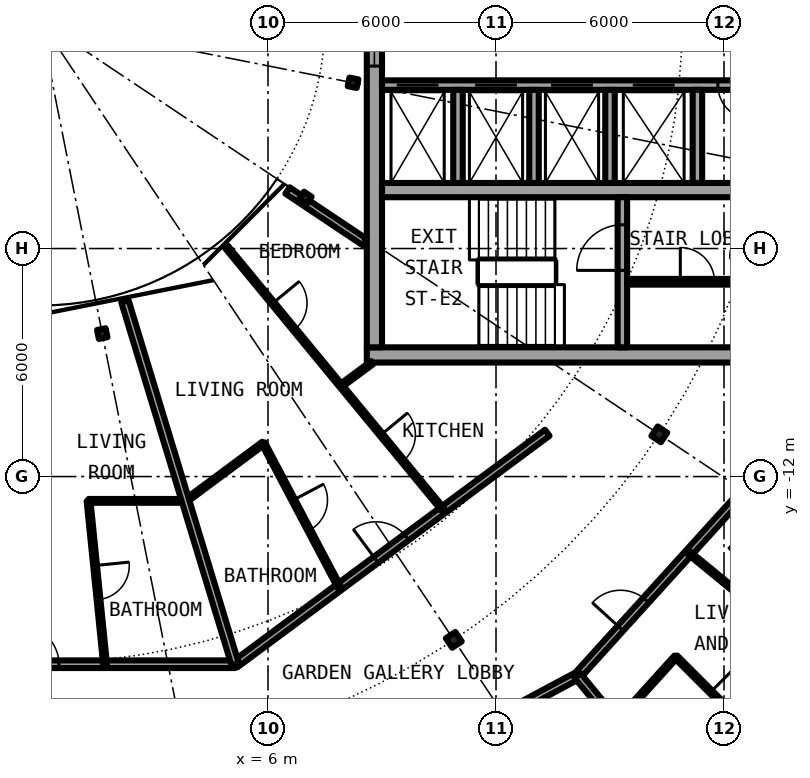
"""IFC4 building model, lengths in metres.
Left out: names, types, materials, properties, quantities, classifications, styles, units other than length and angle.
Written with IfcOpenShell. Run it as: python <this file> out.ifc"""

import sys

from ifc_helpers import new_model, si_unit, direction, frame, frame_2d, origin, origin_2d, place, context, subcontext, project, spatial, rectangle, i_section, extrude, element, fill, save


model = new_model("IFC4")
c1 = context("Model", 3, precision=1e-05, world=origin(), true_north=direction((0.0, 1.0)))
c2 = subcontext(c1, "Body", "Model", "MODEL_VIEW")
j1 = project(units=[si_unit("LENGTHUNIT", "METRE"), si_unit("PLANEANGLEUNIT", "RADIAN")], contexts=[c1])
p1 = place(None, origin())
s1 = spatial("IfcSite", under=j1, at=p1, CompositionType="ELEMENT")
p2 = place(p1, origin())
s2 = spatial("IfcBuilding", under=s1, at=p2, CompositionType="ELEMENT")
p3 = place(p2, frame((0.0, 0.0, 234.05)))
s3 = spatial("IfcBuildingStorey", under=s2, at=p3, CompositionType="ELEMENT", Elevation=234.05)
for number, where, z_axis, x_axis in (
    (1, (10.889, -16.297, 0.0), (0.0, 0.0, 1.0), (0.556, -0.831, 0.0)),
    (2, (16.297, -10.889, 0.0), (0.0, 0.0, 1.0), (0.831, -0.556, 0.0)),
):
    element("IfcColumn", number, at=place(p3, frame(where, z_axis=z_axis, x_axis=x_axis)), inside=s3, PredefinedType="COLUMN", context=c2, shape_type="SweptSolid", body=[
        extrude(i_section(OverallWidth=0.3, OverallDepth=0.3, WebThickness=0.011, FlangeThickness=0.019, FilletRadius=0.027, at=origin_2d()), origin(), (0.0, 0.0, 1.0), 3.05),
    ])
for number, where, z_axis, x_axis in (
    (3, (1.639, -8.239, 0.0), (0.0, 0.0, 1.0), (0.195, -0.981, 0.0)),
    (4, (6.984, -4.667, 0.0), (0.0, 0.0, 1.0), (0.831, -0.556, 0.0)),
    (5, (8.239, -1.639, 0.0), (0.0, 0.0, 1.0), (0.981, -0.195, 0.0)),
):
    element("IfcColumn", number, at=place(p3, frame(where, z_axis=z_axis, x_axis=x_axis)), inside=s3, PredefinedType="COLUMN", context=c2, shape_type="SweptSolid", body=[
        extrude(i_section(OverallWidth=0.24, OverallDepth=0.23, WebThickness=0.008, FlangeThickness=0.012, FilletRadius=0.021, at=origin_2d()), origin(), (0.0, 0.0, 1.0), 3.05),
    ])
p4 = place(p3, frame((8.6, -8.8, 0.0), z_axis=(0.0, 0.0, 1.0), x_axis=(1.0, 0.0, 0.0)))
e6 = element("IfcWall", 6, at=p4, inside=s3, PredefinedType="SHEAR", context=c2, shape_type="SweptSolid", body=[
    extrude(rectangle(XDim=13.4, YDim=0.4, at=frame_2d((6.7, 0.0))), origin(), (0.0, 0.0, 1.0), 3.05),
])
p5 = place(p4, frame((11.275, 0.0, 0.0)))
e7 = element("IfcOpeningElement", 7, at=p5, cuts=e6, PredefinedType="OPENING", context=c2, shape_type="SweptSolid", body=[
    extrude(rectangle(XDim=1.2, YDim=2.3, at=frame_2d((0.6, 1.15))), frame((0.0, 0.21, 0.0), z_axis=(0.0, -1.0, 0.0), x_axis=(1.0, 0.0, 0.0)), (0.0, 0.0, 1.0), 0.42),
])
p6 = place(p3, frame((8.8, -8.6, 0.0), z_axis=(0.0, 0.0, 1.0), x_axis=(0.0, 1.0, 0.0)))
e8 = element("IfcWall", 8, at=p6, inside=s3, PredefinedType="SHEAR", context=c2, shape_type="SweptSolid", body=[
    extrude(rectangle(XDim=17.2, YDim=0.4, at=frame_2d((8.6, 0.0))), origin(), (0.0, 0.0, 1.0), 3.05),
])
p7 = place(p6, frame((7.4, 0.0, 0.1)))
e9 = element("IfcOpeningElement", 9, at=p7, cuts=e8, PredefinedType="OPENING", context=c2, shape_type="SweptSolid", body=[
    extrude(rectangle(XDim=2.4, YDim=2.2, at=frame_2d((1.2, 1.1))), frame((0.0, 0.21, 0.0), z_axis=(0.0, -1.0, 0.0), x_axis=(1.0, 0.0, 0.0)), (0.0, 0.0, 1.0), 0.42),
])
p8 = place(p3, frame((19.15, -1.7, 0.0), z_axis=(0.0, 0.0, 1.0), x_axis=(-1.0, 0.0, 0.0)))
e10 = element("IfcWall", 10, at=p8, inside=s3, PredefinedType="SHEAR", context=c2, shape_type="SweptSolid", body=[
    extrude(rectangle(XDim=10.15, YDim=0.25, at=frame_2d((5.075, 0.0))), origin(), (0.0, 0.0, 1.0), 3.05),
])
p9 = place(p8, frame((8.663, 0.0, 0.0)))
e11 = element("IfcOpeningElement", 11, at=p9, cuts=e10, PredefinedType="OPENING", context=c2, shape_type="SweptSolid", body=[
    extrude(rectangle(XDim=1.1, YDim=2.3, at=frame_2d((0.55, 1.15))), frame((0.0, 0.135, 0.0), z_axis=(0.0, -1.0, 0.0), x_axis=(1.0, 0.0, 0.0)), (0.0, 0.0, 1.0), 0.27),
])
p10 = place(p8, frame((6.6, 0.0, 0.0)))
e12 = element("IfcOpeningElement", 12, at=p10, cuts=e10, PredefinedType="OPENING", context=c2, shape_type="SweptSolid", body=[
    extrude(rectangle(XDim=1.1, YDim=2.3, at=frame_2d((0.55, 1.15))), frame((0.0, 0.135, 0.0), z_axis=(0.0, -1.0, 0.0), x_axis=(1.0, 0.0, 0.0)), (0.0, 0.0, 1.0), 0.27),
])
p11 = place(p8, frame((4.6, 0.0, 0.0)))
e13 = element("IfcOpeningElement", 13, at=p11, cuts=e10, PredefinedType="OPENING", context=c2, shape_type="SweptSolid", body=[
    extrude(rectangle(XDim=1.1, YDim=2.3, at=frame_2d((0.55, 1.15))), frame((0.0, 0.135, 0.0), z_axis=(0.0, -1.0, 0.0), x_axis=(1.0, 0.0, 0.0)), (0.0, 0.0, 1.0), 0.27),
])
p12 = place(p8, frame((2.45, 0.0, 0.0)))
e14 = element("IfcOpeningElement", 14, at=p12, cuts=e10, PredefinedType="OPENING", context=c2, shape_type="SweptSolid", body=[
    extrude(rectangle(XDim=1.1, YDim=2.3, at=frame_2d((0.55, 1.15))), frame((0.0, 0.135, 0.0), z_axis=(0.0, -1.0, 0.0), x_axis=(1.0, 0.0, 0.0)), (0.0, 0.0, 1.0), 0.27),
])
p13 = place(p8, frame((0.413, 0.0, 0.0)))
e15 = element("IfcOpeningElement", 15, at=p13, cuts=e10, PredefinedType="OPENING", context=c2, shape_type="SweptSolid", body=[
    extrude(rectangle(XDim=0.9, YDim=2.3, at=frame_2d((0.45, 1.15))), frame((0.0, 0.135, 0.0), z_axis=(0.0, -1.0, 0.0), x_axis=(1.0, 0.0, 0.0)), (0.0, 0.0, 1.0), 0.27),
])
p14 = place(p3, frame((9.0, -4.462, 0.0), z_axis=(0.0, 0.0, 1.0), x_axis=(1.0, 0.0, 0.0)))
e16 = element("IfcWall", 16, at=p14, inside=s3, PredefinedType="SHEAR", context=c2, shape_type="SweptSolid", body=[
    extrude(rectangle(XDim=10.15, YDim=0.375, at=frame_2d((5.075, 0.0))), origin(), (0.0, 0.0, 1.0), 3.05),
])
p15 = place(p3, frame((15.325, -8.6, 0.0), z_axis=(0.0, 0.0, 1.0), x_axis=(0.0, 1.0, 0.0)))
e17 = element("IfcWall", 17, at=p15, inside=s3, PredefinedType="SHEAR", context=c2, shape_type="SweptSolid", body=[
    extrude(rectangle(XDim=3.95, YDim=0.25, at=frame_2d((1.975, 0.0))), origin(), (0.0, 0.0, 1.0), 3.05),
])
p16 = place(p15, frame((2.025, 0.0, 0.0)))
e18 = element("IfcOpeningElement", 18, at=p16, cuts=e17, PredefinedType="OPENING", context=c2, shape_type="SweptSolid", body=[
    extrude(rectangle(XDim=1.2, YDim=2.3, at=frame_2d((0.6, 1.15))), frame((0.0, 0.135, 0.0), z_axis=(0.0, -1.0, 0.0), x_axis=(1.0, 0.0, 0.0)), (0.0, 0.0, 1.0), 0.27),
])
for number, where, z_axis, x_axis in (
    (19, (15.0, -1.825, 0.0), (0.0, 0.0, 1.0), (0.0, -1.0, 0.0)),
    (20, (17.3, -1.825, 0.0), (0.0, 0.0, 1.0), (0.0, -1.0, 0.0)),
    (21, (11.0, -1.825, 0.0), (0.0, 0.0, 1.0), (0.0, -1.0, 0.0)),
    (22, (13.0, -1.825, 0.0), (0.0, 0.0, 1.0), (0.0, -1.0, 0.0)),
):
    element("IfcWall", number, at=place(p3, frame(where, z_axis=z_axis, x_axis=x_axis)), inside=s3, PredefinedType="SOLIDWALL", context=c2, shape_type="SweptSolid", body=[
        extrude(rectangle(XDim=2.45, YDim=0.25, at=frame_2d((1.225, 0.0))), origin(), (0.0, 0.0, 1.0), 2.7),
    ])
p17 = place(p3, frame((15.45, -6.875, 0.0), z_axis=(0.0, 0.0, 1.0), x_axis=(1.0, 0.0, 0.0)))
e23 = element("IfcWall", 23, at=p17, inside=s3, PredefinedType="PARTITIONING", context=c2, shape_type="SweptSolid", body=[
    extrude(rectangle(XDim=3.7, YDim=0.15, at=frame_2d((1.85, 0.0))), origin(), (0.0, 0.0, 1.0), 2.7),
])
p18 = place(p17, frame((1.4, 0.0, 0.0)))
e24 = element("IfcOpeningElement", 24, at=p18, cuts=e23, PredefinedType="OPENING", context=c2, shape_type="SweptSolid", body=[
    extrude(rectangle(XDim=0.9, YDim=2.3, at=frame_2d((0.45, 1.15))), frame((0.0, 0.085, 0.0), z_axis=(0.0, -1.0, 0.0), x_axis=(1.0, 0.0, 0.0)), (0.0, 0.0, 1.0), 0.17),
])
p19 = place(p3, frame((15.162, -18.475, 0.0), z_axis=(0.0, 0.0, 1.0), x_axis=(0.671528384412, 0.740978831634, 0.0)))
e25 = element("IfcWall", 25, at=p19, inside=s3, PredefinedType="PARTITIONING", context=c2, shape_type="SweptSolid", body=[
    extrude(rectangle(XDim=2.338, YDim=0.1, at=frame_2d((1.169, 0.0))), origin(), (0.0, 0.0, 1.0), 2.7),
])
p20 = place(p3, frame((14.147, -17.238, 0.0), z_axis=(0.0, 0.0, 1.0), x_axis=(0.671561669125, 0.740948665268, 0.0)))
e26 = element("IfcWall", 26, at=p20, inside=s3, PredefinedType="PARTITIONING", context=c2, shape_type="SweptSolid", body=[
    extrude(rectangle(XDim=6.544, YDim=0.2, at=frame_2d((3.272, 0.0))), origin(), (0.0, 0.0, 1.0), 2.7),
])
p21 = place(p20, frame((1.682, 0.0, 0.0)))
e27 = element("IfcOpeningElement", 27, at=p21, cuts=e26, PredefinedType="OPENING", context=c2, shape_type="SweptSolid", body=[
    extrude(rectangle(XDim=1.0, YDim=2.3, at=frame_2d((0.5, 1.15))), frame((0.0, 0.11, 0.0), z_axis=(0.0, -1.0, 0.0), x_axis=(1.0, 0.0, 0.0)), (0.0, 0.0, 1.0), 0.22),
])
p22 = place(p3, frame((6.48, -21.339, 0.0), z_axis=(0.0, 0.0, 1.0), x_axis=(0.881794682218, 0.471633478892, 0.0)))
e28 = element("IfcWall", 28, at=p22, inside=s3, PredefinedType="PARTITIONING", context=c2, shape_type="SweptSolid", body=[
    extrude(rectangle(XDim=8.702, YDim=0.2, at=frame_2d((4.351, 0.0))), origin(), (0.0, 0.0, 1.0), 2.7),
])
p23 = place(p22, frame((2.758, 0.0, 0.0)))
e29 = element("IfcOpeningElement", 29, at=p23, cuts=e28, PredefinedType="OPENING", context=c2, shape_type="SweptSolid", body=[
    extrude(rectangle(XDim=1.0, YDim=2.3, at=frame_2d((0.5, 1.15))), frame((0.0, 0.11, 0.0), z_axis=(0.0, -1.0, 0.0), x_axis=(1.0, 0.0, 0.0)), (0.0, 0.0, 1.0), 0.22),
])
p24 = place(p3, frame((-5.138, -16.938, 0.0), z_axis=(0.0, 0.0, 1.0), x_axis=(1.0, 0.0, 0.0)))
e30 = element("IfcWall", 30, at=p24, inside=s3, PredefinedType="PARTITIONING", context=c2, shape_type="SweptSolid", body=[
    extrude(rectangle(XDim=10.276, YDim=0.2, at=frame_2d((5.138, 0.0))), origin(), (0.0, 0.0, 1.0), 2.7),
])
p25 = place(p24, frame((4.638, 0.0, 0.0)))
e31 = element("IfcOpeningElement", 31, at=p25, cuts=e30, PredefinedType="OPENING", context=c2, shape_type="SweptSolid", body=[
    extrude(rectangle(XDim=1.0, YDim=2.3, at=frame_2d((0.5, 1.15))), frame((0.0, 0.11, 0.0), z_axis=(0.0, -1.0, 0.0), x_axis=(1.0, 0.0, 0.0)), (0.0, 0.0, 1.0), 0.22),
])
p26 = place(p3, frame((5.137, -16.938, 0.0), z_axis=(0.0, 0.0, 1.0), x_axis=(0.803229232922, 0.595670042371, 0.0)))
e32 = element("IfcWall", 32, at=p26, inside=s3, PredefinedType="PARTITIONING", context=c2, shape_type="SweptSolid", body=[
    extrude(rectangle(XDim=10.224, YDim=0.2, at=frame_2d((5.112, 0.0))), origin(), (0.0, 0.0, 1.0), 2.7),
])
p27 = place(p26, frame((4.612, 0.0, 0.0)))
e33 = element("IfcOpeningElement", 33, at=p27, cuts=e32, PredefinedType="OPENING", context=c2, shape_type="SweptSolid", body=[
    extrude(rectangle(XDim=1.0, YDim=2.3, at=frame_2d((0.5, 1.15))), frame((0.0, 0.11, 0.0), z_axis=(0.0, -1.0, 0.0), x_axis=(1.0, 0.0, 0.0)), (0.0, 0.0, 1.0), 0.22),
])
p28 = place(p3, frame((1.278, -12.64, 0.0), z_axis=(0.0, 0.0, 1.0), x_axis=(1.0, 0.0, 0.0)))
e34 = element("IfcWall", 34, at=p28, inside=s3, PredefinedType="PARTITIONING", context=c2, shape_type="SweptSolid", body=[
    extrude(rectangle(XDim=2.556, YDim=0.1, at=frame_2d((1.278, 0.0))), origin(), (0.0, 0.0, 1.0), 2.7),
])
p29 = place(p3, frame((3.834, -12.64, 0.0), z_axis=(0.0, 0.0, 1.0), x_axis=(0.803259509791, 0.595629213463, 0.0)))
e35 = element("IfcWall", 35, at=p29, inside=s3, PredefinedType="PARTITIONING", context=c2, shape_type="SweptSolid", body=[
    extrude(rectangle(XDim=2.543, YDim=0.1, at=frame_2d((1.272, 0.0))), origin(), (0.0, 0.0, 1.0), 2.7),
])
p30 = place(p3, frame((7.919, -9.611, 0.0), z_axis=(0.0, 0.0, 1.0), x_axis=(0.80321556998, 0.595688465677, 0.0)))
e36 = element("IfcWall", 36, at=p30, inside=s3, PredefinedType="PARTITIONING", context=c2, shape_type="SweptSolid", body=[
    extrude(rectangle(XDim=1.026, YDim=0.1, at=frame_2d((0.513, 0.0))), origin(), (0.0, 0.0, 1.0), 2.7),
])
p31 = place(p3, frame((6.513, -4.472, 0.0), z_axis=(0.0, 0.0, 1.0), x_axis=(0.831450132577, -0.555599385382, 0.0)))
e37 = element("IfcWall", 37, at=p31, inside=s3, PredefinedType="PARTITIONING", context=c2, shape_type="SweptSolid", body=[
    extrude(rectangle(XDim=2.443, YDim=0.2, at=frame_2d((1.221, 0.0))), origin(), (0.0, 0.0, 1.0), 2.7),
])
p32 = place(p3, frame((2.236, -7.39, 0.0), z_axis=(0.0, 0.0, 1.0), x_axis=(0.290580399904, -0.956850579344, 0.0)))
e38 = element("IfcWall", 38, at=p32, inside=s3, PredefinedType="PARTITIONING", context=c2, shape_type="SweptSolid", body=[
    extrude(rectangle(XDim=9.98, YDim=0.2, at=frame_2d((4.99, 0.0))), origin(), (0.0, 0.0, 1.0), 2.7),
])
p33 = place(p3, frame((17.077, -14.006, 0.0), z_axis=(0.0, 0.0, 1.0), x_axis=(0.773476341377, -0.633825172528, 0.0)))
e39 = element("IfcWall", 39, at=p33, inside=s3, PredefinedType="PARTITIONING", context=c2, shape_type="SweptSolid", body=[
    extrude(rectangle(XDim=1.584, YDim=0.1, at=frame_2d((0.792, 0.0))), origin(), (0.0, 0.0, 1.0), 2.7),
])
p34 = place(p3, frame((1.278, -12.64, 0.0), z_axis=(0.0, 0.0, 1.0), x_axis=(0.100650711003, -0.994921823248, 0.0)))
e40 = element("IfcWall", 40, at=p34, inside=s3, PredefinedType="PARTITIONING", context=c2, shape_type="SweptSolid", body=[
    extrude(rectangle(XDim=4.32, YDim=0.1, at=frame_2d((2.16, 0.0))), origin(), (0.0, 0.0, 1.0), 2.7),
])
p35 = place(p34, frame((1.71, 0.0, 0.0)))
e41 = element("IfcOpeningElement", 41, at=p35, cuts=e40, PredefinedType="OPENING", context=c2, shape_type="SweptSolid", body=[
    extrude(rectangle(XDim=0.9, YDim=2.3, at=frame_2d((0.45, 1.15))), frame((0.0, 0.06, 0.0), z_axis=(0.0, -1.0, 0.0), x_axis=(1.0, 0.0, 0.0)), (0.0, 0.0, 1.0), 0.12),
])
p36 = place(p3, frame((4.908, -5.959, 0.0), z_axis=(0.0, 0.0, 1.0), x_axis=(0.636115614725, -0.771593756262, 0.0)))
e42 = element("IfcWall", 42, at=p36, inside=s3, PredefinedType="PARTITIONING", context=c2, shape_type="SweptSolid", body=[
    extrude(rectangle(XDim=8.967, YDim=0.1, at=frame_2d((4.483, 0.0))), origin(), (0.0, 0.0, 1.0), 2.7),
])
p37 = place(p36, frame((6.4, 0.0, 0.0)))
e43 = element("IfcOpeningElement", 43, at=p37, cuts=e42, PredefinedType="OPENING", context=c2, shape_type="SweptSolid", body=[
    extrude(rectangle(XDim=0.9, YDim=2.3, at=frame_2d((0.45, 1.15))), frame((0.0, 0.06, 0.0), z_axis=(0.0, -1.0, 0.0), x_axis=(1.0, 0.0, 0.0)), (0.0, 0.0, 1.0), 0.12),
])
p38 = place(p36, frame((1.917, 0.0, 0.0)))
e44 = element("IfcOpeningElement", 44, at=p38, cuts=e42, PredefinedType="OPENING", context=c2, shape_type="SweptSolid", body=[
    extrude(rectangle(XDim=0.9, YDim=2.3, at=frame_2d((0.45, 1.15))), frame((0.0, 0.06, 0.0), z_axis=(0.0, -1.0, 0.0), x_axis=(1.0, 0.0, 0.0)), (0.0, 0.0, 1.0), 0.12),
])
p39 = place(p3, frame((5.877, -11.125, 0.0), z_axis=(0.0, 0.0, 1.0), x_axis=(0.467030118529, -0.884241408432, 0.0)))
e45 = element("IfcWall", 45, at=p39, inside=s3, PredefinedType="PARTITIONING", context=c2, shape_type="SweptSolid", body=[
    extrude(rectangle(XDim=4.278, YDim=0.1, at=frame_2d((2.139, 0.0))), origin(), (0.0, 0.0, 1.0), 2.7),
])
p40 = place(p39, frame((1.689, 0.0, 0.0)))
e46 = element("IfcOpeningElement", 46, at=p40, cuts=e45, PredefinedType="OPENING", context=c2, shape_type="SweptSolid", body=[
    extrude(rectangle(XDim=0.9, YDim=2.3, at=frame_2d((0.45, 1.15))), frame((0.0, 0.06, 0.0), z_axis=(0.0, -1.0, 0.0), x_axis=(1.0, 0.0, 0.0)), (0.0, 0.0, 1.0), 0.12),
])
p41 = place(p3, frame((14.147, -17.238, 0.0), z_axis=(0.0, 0.0, 1.0), x_axis=(0.634374159378, -0.773026148273, 0.0)))
e47 = element("IfcWall", 47, at=p41, inside=s3, PredefinedType="PARTITIONING", context=c2, shape_type="SweptSolid", body=[
    extrude(rectangle(XDim=4.876, YDim=0.2, at=frame_2d((2.438, 0.0))), origin(), (0.0, 0.0, 1.0), 2.7),
])
p42 = place(p3, frame((16.732, -16.743, 0.0), z_axis=(0.0, 0.0, 1.0), x_axis=(0.706967463531, -0.707246071398, 0.0)))
e48 = element("IfcWall", 48, at=p42, inside=s3, PredefinedType="PARTITIONING", context=c2, shape_type="SweptSolid", body=[
    extrude(rectangle(XDim=3.505, YDim=0.1, at=frame_2d((1.752, 0.0))), origin(), (0.0, 0.0, 1.0), 2.7),
])
p43 = place(p42, frame((1.303, 0.0, 0.0)))
e49 = element("IfcOpeningElement", 49, at=p43, cuts=e48, PredefinedType="OPENING", context=c2, shape_type="SweptSolid", body=[
    extrude(rectangle(XDim=0.9, YDim=2.3, at=frame_2d((0.45, 1.15))), frame((0.0, 0.06, 0.0), z_axis=(0.0, -1.0, 0.0), x_axis=(1.0, 0.0, 0.0)), (0.0, 0.0, 1.0), 0.12),
])
p44 = place(p9, origin())
e50 = element("IfcDoor", 50, at=p44, inside=s3, OperationType="DOUBLE_DOOR_SLIDING", PredefinedType="DOOR", context=c2, shape_type="SweptSolid", body=[
    extrude(rectangle(XDim=1.1, YDim=2.3, at=frame_2d((0.55, 1.15))), frame((0.0, 0.025, 0.0), z_axis=(0.0, -1.0, 0.0), x_axis=(1.0, 0.0, 0.0)), (0.0, 0.0, 1.0), 0.05),
])
fill(e11, e50)
p45 = place(p10, origin())
e51 = element("IfcDoor", 51, at=p45, inside=s3, OperationType="DOUBLE_DOOR_SLIDING", PredefinedType="DOOR", context=c2, shape_type="SweptSolid", body=[
    extrude(rectangle(XDim=1.1, YDim=2.3, at=frame_2d((0.55, 1.15))), frame((0.0, 0.025, 0.0), z_axis=(0.0, -1.0, 0.0), x_axis=(1.0, 0.0, 0.0)), (0.0, 0.0, 1.0), 0.05),
])
fill(e12, e51)
p46 = place(p11, origin())
e52 = element("IfcDoor", 52, at=p46, inside=s3, OperationType="DOUBLE_DOOR_SLIDING", PredefinedType="DOOR", context=c2, shape_type="SweptSolid", body=[
    extrude(rectangle(XDim=1.1, YDim=2.3, at=frame_2d((0.55, 1.15))), frame((0.0, 0.025, 0.0), z_axis=(0.0, -1.0, 0.0), x_axis=(1.0, 0.0, 0.0)), (0.0, 0.0, 1.0), 0.05),
])
fill(e13, e52)
p47 = place(p12, origin())
e53 = element("IfcDoor", 53, at=p47, inside=s3, OperationType="DOUBLE_DOOR_SLIDING", PredefinedType="DOOR", context=c2, shape_type="SweptSolid", body=[
    extrude(rectangle(XDim=1.1, YDim=2.3, at=frame_2d((0.55, 1.15))), frame((0.0, 0.025, 0.0), z_axis=(0.0, -1.0, 0.0), x_axis=(1.0, 0.0, 0.0)), (0.0, 0.0, 1.0), 0.05),
])
fill(e14, e53)
p48 = place(p13, origin())
e54 = element("IfcDoor", 54, at=p48, inside=s3, OperationType="SINGLE_SWING_RIGHT", PredefinedType="DOOR", context=c2, shape_type="SweptSolid", body=[
    extrude(rectangle(XDim=0.9, YDim=2.3, at=frame_2d((0.45, 1.15))), frame((0.0, 0.025, 0.0), z_axis=(0.0, -1.0, 0.0), x_axis=(1.0, 0.0, 0.0)), (0.0, 0.0, 1.0), 0.05),
])
fill(e15, e54)
p49 = place(p18, origin())
e55 = element("IfcDoor", 55, at=p49, inside=s3, OperationType="SINGLE_SWING_LEFT", PredefinedType="DOOR", context=c2, shape_type="SweptSolid", body=[
    extrude(rectangle(XDim=0.9, YDim=2.3, at=frame_2d((0.45, 1.15))), frame((0.0, 0.025, 0.0), z_axis=(0.0, -1.0, 0.0), x_axis=(1.0, 0.0, 0.0)), (0.0, 0.0, 1.0), 0.05),
])
fill(e24, e55)
p50 = place(p16, origin())
e56 = element("IfcDoor", 56, at=p50, inside=s3, OperationType="SINGLE_SWING_LEFT", PredefinedType="DOOR", context=c2, shape_type="SweptSolid", body=[
    extrude(rectangle(XDim=1.2, YDim=2.3, at=frame_2d((0.6, 1.15))), frame((0.0, 0.025, 0.0), z_axis=(0.0, -1.0, 0.0), x_axis=(1.0, 0.0, 0.0)), (0.0, 0.0, 1.0), 0.05),
])
fill(e18, e56)
p51 = place(p7, origin())
e57 = element("IfcWindow", 57, at=p51, inside=s3, PartitioningType="SINGLE_PANEL", PredefinedType="WINDOW", context=c2, shape_type="SweptSolid", body=[
    extrude(rectangle(XDim=2.4, YDim=2.2, at=frame_2d((1.2, 1.1))), frame((0.0, 0.03, 0.0), z_axis=(0.0, -1.0, 0.0), x_axis=(1.0, 0.0, 0.0)), (0.0, 0.0, 1.0), 0.06),
])
fill(e9, e57)
p52 = place(p21, origin())
e58 = element("IfcDoor", 58, at=p52, inside=s3, OperationType="SINGLE_SWING_LEFT", PredefinedType="DOOR", context=c2, shape_type="SweptSolid", body=[
    extrude(rectangle(XDim=1.0, YDim=2.3, at=frame_2d((0.5, 1.15))), frame((0.0, 0.025, 0.0), z_axis=(0.0, -1.0, 0.0), x_axis=(1.0, 0.0, 0.0)), (0.0, 0.0, 1.0), 0.05),
])
fill(e27, e58)
p53 = place(p43, origin())
e59 = element("IfcDoor", 59, at=p53, inside=s3, OperationType="SINGLE_SWING_LEFT", PredefinedType="DOOR", context=c2, shape_type="SweptSolid", body=[
    extrude(rectangle(XDim=0.9, YDim=2.3, at=frame_2d((0.45, 1.15))), frame((0.0, 0.025, 0.0), z_axis=(0.0, -1.0, 0.0), x_axis=(1.0, 0.0, 0.0)), (0.0, 0.0, 1.0), 0.05),
])
fill(e49, e59)
p54 = place(p25, origin())
e60 = element("IfcDoor", 60, at=p54, inside=s3, OperationType="SINGLE_SWING_LEFT", PredefinedType="DOOR", context=c2, shape_type="SweptSolid", body=[
    extrude(rectangle(XDim=1.0, YDim=2.3, at=frame_2d((0.5, 1.15))), frame((0.0, 0.025, 0.0), z_axis=(0.0, -1.0, 0.0), x_axis=(1.0, 0.0, 0.0)), (0.0, 0.0, 1.0), 0.05),
])
fill(e31, e60)
p55 = place(p35, origin())
e61 = element("IfcDoor", 61, at=p55, inside=s3, OperationType="SINGLE_SWING_RIGHT", PredefinedType="DOOR", context=c2, shape_type="SweptSolid", body=[
    extrude(rectangle(XDim=0.9, YDim=2.3, at=frame_2d((0.45, 1.15))), frame((0.0, 0.025, 0.0), z_axis=(0.0, -1.0, 0.0), x_axis=(1.0, 0.0, 0.0)), (0.0, 0.0, 1.0), 0.05),
])
fill(e41, e61)
p56 = place(p27, origin())
e62 = element("IfcDoor", 62, at=p56, inside=s3, OperationType="SINGLE_SWING_RIGHT", PredefinedType="DOOR", context=c2, shape_type="SweptSolid", body=[
    extrude(rectangle(XDim=1.0, YDim=2.3, at=frame_2d((0.5, 1.15))), frame((0.0, 0.025, 0.0), z_axis=(0.0, -1.0, 0.0), x_axis=(1.0, 0.0, 0.0)), (0.0, 0.0, 1.0), 0.05),
])
fill(e33, e62)
p57 = place(p40, origin())
e63 = element("IfcDoor", 63, at=p57, inside=s3, OperationType="SINGLE_SWING_RIGHT", PredefinedType="DOOR", context=c2, shape_type="SweptSolid", body=[
    extrude(rectangle(XDim=0.9, YDim=2.3, at=frame_2d((0.45, 1.15))), frame((0.0, 0.025, 0.0), z_axis=(0.0, -1.0, 0.0), x_axis=(1.0, 0.0, 0.0)), (0.0, 0.0, 1.0), 0.05),
])
fill(e46, e63)
p58 = place(p37, origin())
e64 = element("IfcDoor", 64, at=p58, inside=s3, OperationType="SINGLE_SWING_RIGHT", PredefinedType="DOOR", context=c2, shape_type="SweptSolid", body=[
    extrude(rectangle(XDim=0.9, YDim=2.3, at=frame_2d((0.45, 1.15))), frame((0.0, 0.025, 0.0), z_axis=(0.0, -1.0, 0.0), x_axis=(1.0, 0.0, 0.0)), (0.0, 0.0, 1.0), 0.05),
])
fill(e43, e64)
p59 = place(p38, origin())
e65 = element("IfcDoor", 65, at=p59, inside=s3, OperationType="SINGLE_SWING_LEFT", PredefinedType="DOOR", context=c2, shape_type="SweptSolid", body=[
    extrude(rectangle(XDim=0.9, YDim=2.3, at=frame_2d((0.45, 1.15))), frame((0.0, 0.025, 0.0), z_axis=(0.0, -1.0, 0.0), x_axis=(1.0, 0.0, 0.0)), (0.0, 0.0, 1.0), 0.05),
])
fill(e44, e65)
save(model, sys.argv[1])
